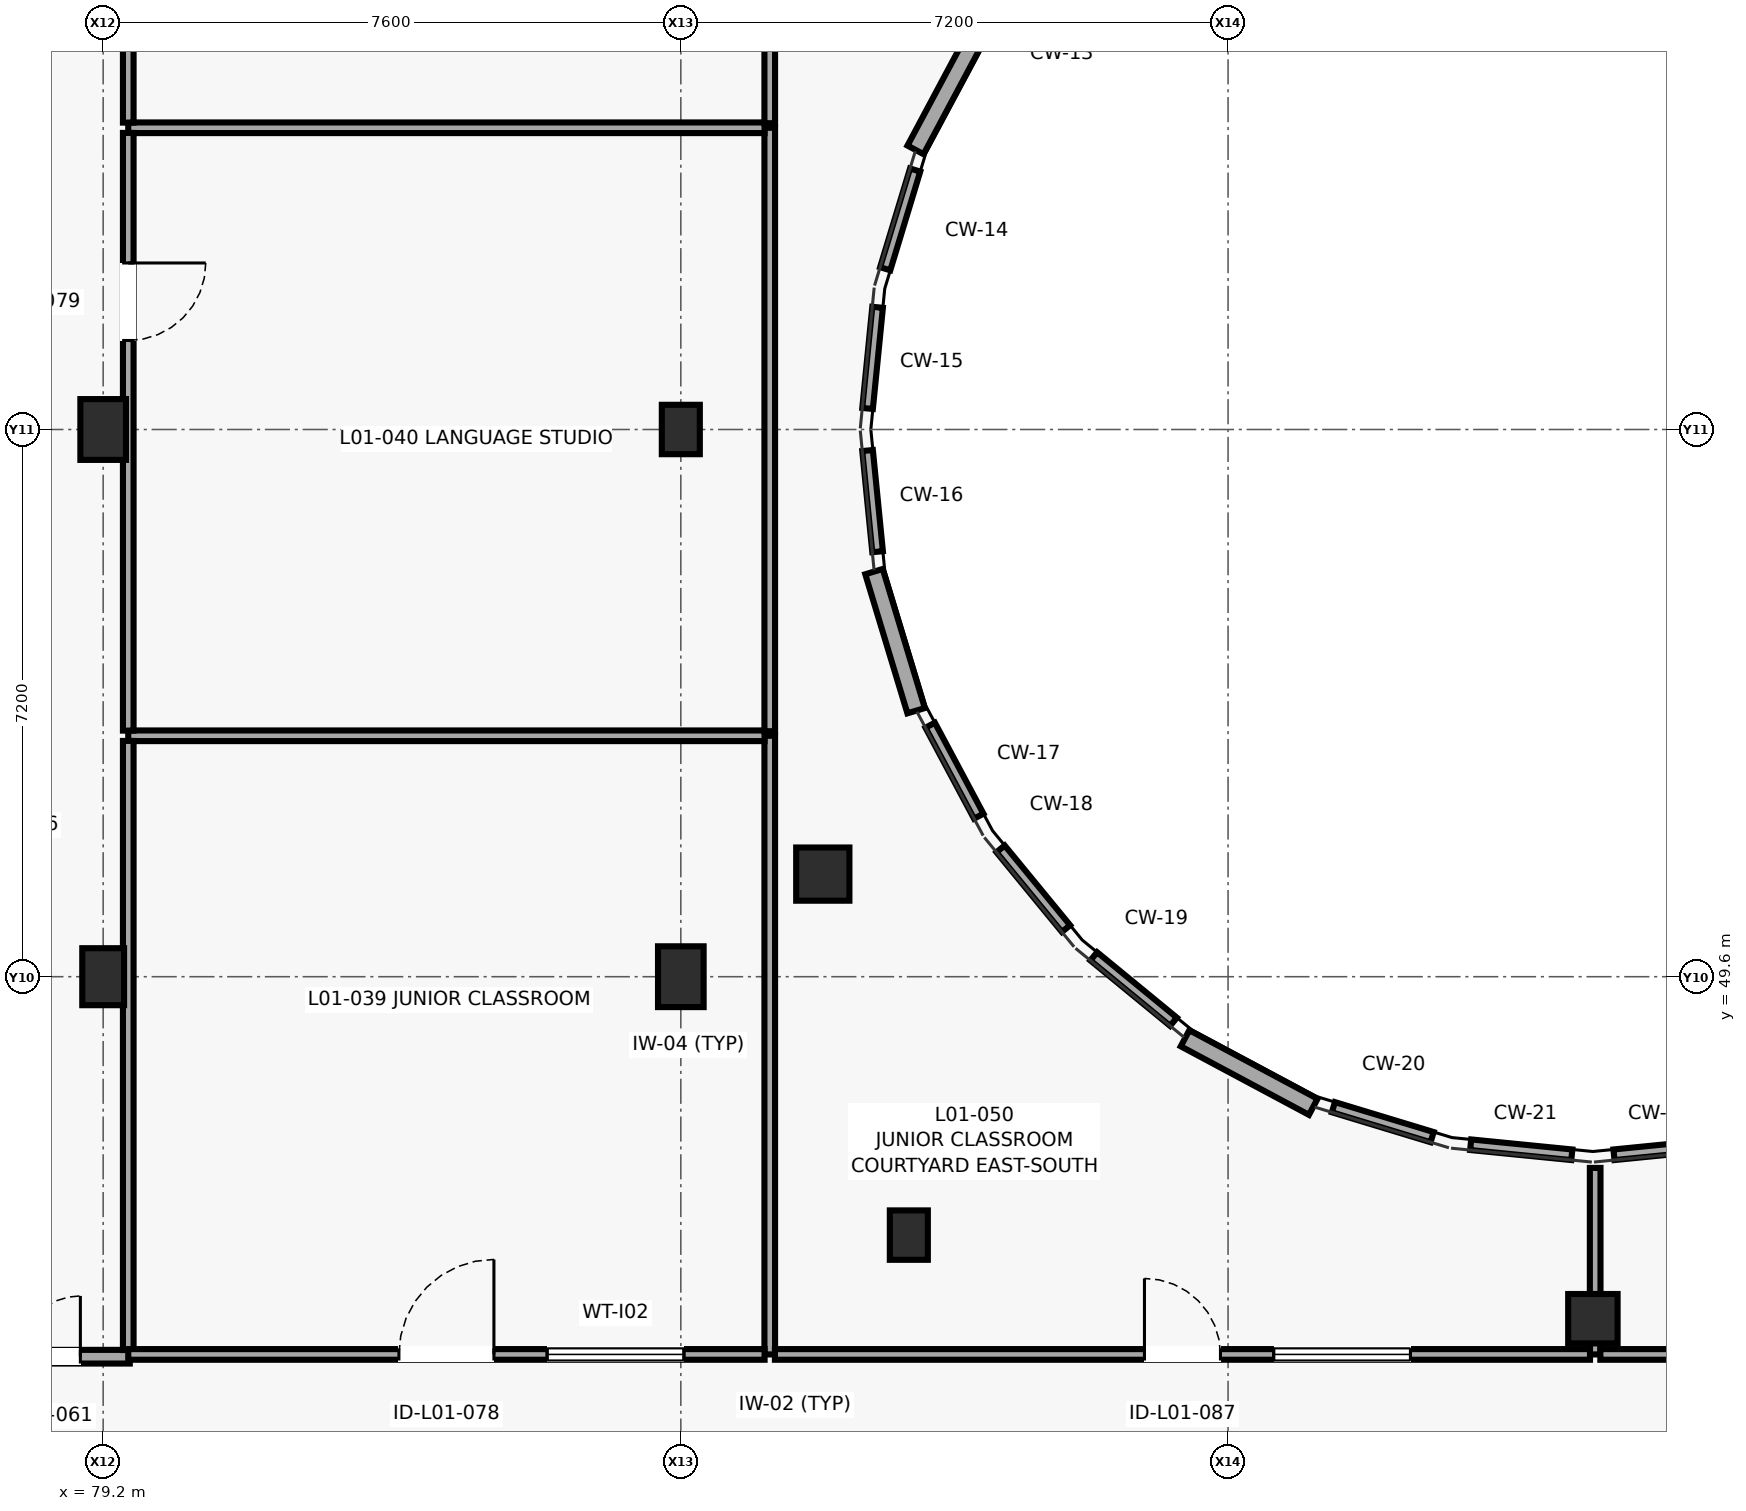
"""IFC4 building model, lengths in metres.
Left out: names, types, materials, properties, quantities, classifications, styles, units other than length and angle.
Written with IfcOpenShell. Run it as: python <this file> out.ifc"""

import sys

from ifc_helpers import new_model, si_unit, direction, frame, frame_2d, origin, origin_2d, place, context, subcontext, project, spatial, rectangle, circle, extrude, element, fill, save


model = new_model("IFC4")
c1 = context("Model", 3, precision=1e-05, world=origin(), true_north=direction((0.0, 1.0)))
c2 = subcontext(c1, "Body", "Model", "MODEL_VIEW")
j1 = project(units=[si_unit("LENGTHUNIT", "METRE"), si_unit("PLANEANGLEUNIT", "RADIAN")], contexts=[c1])
p1 = place(None, origin())
s1 = spatial("IfcSite", under=j1, at=p1, CompositionType="ELEMENT")
p2 = place(p1, origin())
s2 = spatial("IfcBuilding", under=s1, at=p2, CompositionType="ELEMENT")
p3 = place(p2, frame((0.0, 0.0, 4.2)))
s3 = spatial("IfcBuildingStorey", under=s2, at=p3, CompositionType="ELEMENT", Elevation=4.2)
p4 = place(p3, frame((79.2, 49.6, 0.0), z_axis=(0.0, 0.0, 1.0), x_axis=(1.0, 0.0, 0.0)))
e1 = element("IfcColumn", 1, at=p4, inside=s3, PredefinedType="COLUMN", context=c2, shape_type="SweptSolid", body=[
    extrude(rectangle(XDim=0.55, YDim=0.75, at=origin_2d()), origin(), (0.0, 0.0, 1.0), 4.0),
])
for number, where, z_axis, x_axis in (
    (2, (79.2, 56.8, 0.0), (0.0, 0.0, 1.0), (1.0, 0.0, 0.0)),
    (3, (86.8, 49.6, 0.0), (0.0, 0.0, 1.0), (1.0, 0.0, 0.0)),
):
    element("IfcColumn", number, at=place(p3, frame(where, z_axis=z_axis, x_axis=x_axis)), inside=s3, PredefinedType="COLUMN", context=c2, shape_type="SweptSolid", body=[
        extrude(rectangle(XDim=0.6, YDim=0.8, at=origin_2d()), origin(), (0.0, 0.0, 1.0), 4.0),
    ])
p5 = place(p3, frame((86.8, 56.8, 0.0), z_axis=(0.0, 0.0, 1.0), x_axis=(1.0, 0.0, 0.0)))
e4 = element("IfcColumn", 4, at=p5, inside=s3, PredefinedType="COLUMN", context=c2, shape_type="SweptSolid", body=[
    extrude(rectangle(XDim=0.5, YDim=0.65, at=origin_2d()), origin(), (0.0, 0.0, 1.0), 4.0),
])
p6 = place(p3, frame((88.668, 50.95, 0.0), z_axis=(0.0, 0.0, 1.0), x_axis=(1.0, 0.0, 0.0)))
e5 = element("IfcColumn", 5, at=p6, inside=s3, PredefinedType="COLUMN", context=c2, shape_type="SweptSolid", body=[
    extrude(circle(Radius=0.35, at=origin_2d()), origin(), (0.0, 0.0, 1.0), 4.0),
])
p7 = place(p3, frame((89.8, 46.2, 0.0), z_axis=(0.0, 0.0, 1.0), x_axis=(1.0, 0.0, 0.0)))
e6 = element("IfcColumn", 6, at=p7, inside=s3, PredefinedType="COLUMN", context=c2, shape_type="SweptSolid", body=[
    extrude(rectangle(XDim=0.5, YDim=0.65, at=origin_2d()), origin(), (0.0, 0.0, 1.0), 4.0),
])
p8 = place(p3, frame((98.8, 45.1, 0.0), z_axis=(0.0, 0.0, 1.0), x_axis=(1.0, 0.0, 0.0)))
e7 = element("IfcColumn", 7, at=p8, inside=s3, PredefinedType="COLUMN", context=c2, shape_type="SweptSolid", body=[
    extrude(circle(Radius=0.325, at=origin_2d()), origin(), (0.0, 0.0, 1.0), 4.0),
])
p9 = place(p3, frame((90.79, 62.166, 0.0), z_axis=(0.0, 0.0, 1.0), x_axis=(-0.471548403175, -0.881840180227, 0.0)))
e8 = element("IfcWall", 8, at=p9, inside=s3, PredefinedType="SOLIDWALL", context=c2, shape_type="SweptSolid", body=[
    extrude(rectangle(XDim=1.913, YDim=0.24, at=frame_2d((0.957, 0.0))), origin(), (0.0, 0.0, 1.0), 3.78),
])
p10 = place(p3, frame((89.342, 54.93, 0.0), z_axis=(0.0, 0.0, 1.0), x_axis=(0.289748657608, -0.957102771605, 0.0)))
e9 = element("IfcWall", 9, at=p10, inside=s3, PredefinedType="SOLIDWALL", context=c2, shape_type="SweptSolid", body=[
    extrude(rectangle(XDim=1.912, YDim=0.24, at=frame_2d((0.956, 0.0))), origin(), (0.0, 0.0, 1.0), 3.78),
])
p11 = place(p3, frame((93.434, 48.79, 0.0), z_axis=(0.0, 0.0, 1.0), x_axis=(0.881840180227, -0.471548403175, 0.0)))
e10 = element("IfcWall", 10, at=p11, inside=s3, PredefinedType="SOLIDWALL", context=c2, shape_type="SweptSolid", body=[
    extrude(rectangle(XDim=1.913, YDim=0.24, at=frame_2d((0.957, 0.0))), origin(), (0.0, 0.0, 1.0), 3.78),
])
p12 = place(p3, frame((76.65, 44.6, 0.0), z_axis=(0.0, 0.0, 1.0), x_axis=(1.0, 0.0, 0.0)))
e11 = element("IfcWall", 11, at=p12, inside=s3, PredefinedType="PARTITIONING", context=c2, shape_type="SweptSolid", body=[
    extrude(rectangle(XDim=2.9, YDim=0.18, at=frame_2d((1.45, 0.0))), origin(), (0.0, 0.0, 1.0), 3.78),
])
p13 = place(p12, frame((0.65, 0.0, 0.0)))
e12 = element("IfcOpeningElement", 12, at=p13, cuts=e11, PredefinedType="OPENING", context=c2, shape_type="SweptSolid", body=[
    extrude(rectangle(XDim=1.6, YDim=2.25, at=frame_2d((0.8, 1.125))), frame((0.0, 0.1, 0.0), z_axis=(0.0, -1.0, 0.0), x_axis=(1.0, 0.0, 0.0)), (0.0, 0.0, 1.0), 0.2),
])
p14 = place(p3, frame((87.97, 44.63, 0.0), z_axis=(0.0, 0.0, 1.0), x_axis=(0.0, 1.0, 0.0)))
e13 = element("IfcWall", 13, at=p14, inside=s3, PredefinedType="PARTITIONING", context=c2, shape_type="SweptSolid", body=[
    extrude(rectangle(XDim=8.14, YDim=0.14, at=frame_2d((4.07, 0.0))), origin(), (0.0, 0.0, 1.0), 3.775),
])
p15 = place(p3, frame((87.902, 52.77, 0.0), z_axis=(0.0, 0.0, 1.0), x_axis=(-1.0, 0.0, 0.0)))
e14 = element("IfcWall", 14, at=p15, inside=s3, PredefinedType="PARTITIONING", context=c2, shape_type="SweptSolid", body=[
    extrude(rectangle(XDim=8.372, YDim=0.14, at=frame_2d((4.186, 0.0))), origin(), (0.0, 0.0, 1.0), 3.775),
])
p16 = place(p3, frame((79.53, 52.702, 0.0), z_axis=(0.0, 0.0, 1.0), x_axis=(0.0, -1.0, 0.0)))
e15 = element("IfcWall", 15, at=p16, inside=s3, PredefinedType="PARTITIONING", context=c2, shape_type="SweptSolid", body=[
    extrude(rectangle(XDim=8.014, YDim=0.14, at=frame_2d((4.007, 0.0))), origin(), (0.0, 0.0, 1.0), 3.775),
])
p17 = place(p3, frame((79.53, 44.63, 0.0), z_axis=(0.0, 0.0, 1.0), x_axis=(1.0, 0.0, 0.0)))
e16 = element("IfcWall", 16, at=p17, inside=s3, PredefinedType="PARTITIONING", context=c2, shape_type="SweptSolid", body=[
    extrude(rectangle(XDim=8.372, YDim=0.14, at=frame_2d((4.186, 0.0))), origin(), (0.0, 0.0, 1.0), 3.775),
])
p18 = place(p17, frame((3.561, 0.0, 0.0)))
e17 = element("IfcOpeningElement", 17, at=p18, cuts=e16, PredefinedType="OPENING", context=c2, shape_type="SweptSolid", body=[
    extrude(rectangle(XDim=1.25, YDim=2.22, at=frame_2d((0.625, 1.11))), frame((0.0, 0.08, 0.0), z_axis=(0.0, -1.0, 0.0), x_axis=(1.0, 0.0, 0.0)), (0.0, 0.0, 1.0), 0.16),
])
p19 = place(p17, frame((5.511, 0.0, 1.05)))
e18 = element("IfcOpeningElement", 18, at=p19, cuts=e16, PredefinedType="OPENING", context=c2, shape_type="SweptSolid", body=[
    extrude(rectangle(XDim=1.8, YDim=1.2, at=frame_2d((0.9, 0.6))), frame((0.0, 0.08, 0.0), z_axis=(0.0, -1.0, 0.0), x_axis=(1.0, 0.0, 0.0)), (0.0, 0.0, 1.0), 0.16),
])
p20 = place(p3, frame((87.97, 52.83, 0.0), z_axis=(0.0, 0.0, 1.0), x_axis=(0.0, 1.0, 0.0)))
e19 = element("IfcWall", 19, at=p20, inside=s3, PredefinedType="PARTITIONING", context=c2, shape_type="SweptSolid", body=[
    extrude(rectangle(XDim=7.94, YDim=0.14, at=frame_2d((3.97, 0.0))), origin(), (0.0, 0.0, 1.0), 3.775),
])
p21 = place(p3, frame((87.902, 60.77, 0.0), z_axis=(0.0, 0.0, 1.0), x_axis=(-1.0, 0.0, 0.0)))
e20 = element("IfcWall", 20, at=p21, inside=s3, PredefinedType="PARTITIONING", context=c2, shape_type="SweptSolid", body=[
    extrude(rectangle(XDim=8.372, YDim=0.14, at=frame_2d((4.186, 0.0))), origin(), (0.0, 0.0, 1.0), 3.775),
])
p22 = place(p3, frame((79.53, 60.702, 0.0), z_axis=(0.0, 0.0, 1.0), x_axis=(0.0, -1.0, 0.0)))
e21 = element("IfcWall", 21, at=p22, inside=s3, PredefinedType="PARTITIONING", context=c2, shape_type="SweptSolid", body=[
    extrude(rectangle(XDim=7.864, YDim=0.14, at=frame_2d((3.932, 0.0))), origin(), (0.0, 0.0, 1.0), 3.775),
])
p23 = place(p22, frame((1.711, 0.0, 0.0)))
e22 = element("IfcOpeningElement", 22, at=p23, cuts=e21, PredefinedType="OPENING", context=c2, shape_type="SweptSolid", body=[
    extrude(rectangle(XDim=1.02, YDim=2.14, at=frame_2d((0.51, 1.07))), frame((0.0, 0.08, 0.0), z_axis=(0.0, -1.0, 0.0), x_axis=(1.0, 0.0, 0.0)), (0.0, 0.0, 1.0), 0.16),
])
p24 = place(p3, frame((79.53, 68.912, 0.0), z_axis=(0.0, 0.0, 1.0), x_axis=(0.0, -1.0, 0.0)))
e23 = element("IfcWall", 23, at=p24, inside=s3, PredefinedType="PARTITIONING", context=c2, shape_type="SweptSolid", body=[
    extrude(rectangle(XDim=8.074, YDim=0.14, at=frame_2d((4.037, 0.0))), origin(), (0.0, 0.0, 1.0), 3.775),
])
p25 = place(p3, frame((87.97, 60.83, 0.0), z_axis=(0.0, 0.0, 1.0), x_axis=(0.0, 1.0, 0.0)))
e24 = element("IfcWall", 24, at=p25, inside=s3, PredefinedType="PARTITIONING", context=c2, shape_type="SweptSolid", body=[
    extrude(rectangle(XDim=8.14, YDim=0.14, at=frame_2d((4.07, 0.0))), origin(), (0.0, 0.0, 1.0), 3.775),
])
p26 = place(p3, frame((100.408, 47.389, 0.0), z_axis=(0.0, 0.0, 1.0), x_axis=(-0.99513072014, -0.098563937798, 0.0)))
e25 = element("IfcWall", 25, at=p26, inside=s3, PredefinedType="PARTITIONING", context=c2, shape_type="SweptSolid", body=[
    extrude(rectangle(XDim=1.338, YDim=0.14, at=frame_2d((0.669, 0.0))), origin(), (0.0, 0.0, 1.0), 3.775),
])
p27 = place(p3, frame((98.83, 47.084, 0.0), z_axis=(0.0, 0.0, 1.0), x_axis=(0.0, -1.0, 0.0)))
e26 = element("IfcWall", 26, at=p27, inside=s3, PredefinedType="PARTITIONING", context=c2, shape_type="SweptSolid", body=[
    extrude(rectangle(XDim=2.454, YDim=0.14, at=frame_2d((1.227, 0.0))), origin(), (0.0, 0.0, 1.0), 3.775),
])
p28 = place(p3, frame((98.898, 44.63, 0.0), z_axis=(0.0, 0.0, 1.0), x_axis=(1.0, 0.0, 0.0)))
e27 = element("IfcWall", 27, at=p28, inside=s3, PredefinedType="PARTITIONING", context=c2, shape_type="SweptSolid", body=[
    extrude(rectangle(XDim=8.939, YDim=0.14, at=frame_2d((4.469, 0.0))), origin(), (0.0, 0.0, 1.0), 3.775),
])
p29 = place(p28, frame((3.97, 0.0, 0.0)))
e28 = element("IfcOpeningElement", 28, at=p29, cuts=e27, PredefinedType="OPENING", context=c2, shape_type="SweptSolid", body=[
    extrude(rectangle(XDim=1.0, YDim=2.1, at=frame_2d((0.5, 1.05))), frame((0.0, 0.08, 0.0), z_axis=(0.0, -1.0, 0.0), x_axis=(1.0, 0.0, 0.0)), (0.0, 0.0, 1.0), 0.16),
])
p30 = place(p28, frame((5.67, 0.0, 1.05)))
e29 = element("IfcOpeningElement", 29, at=p30, cuts=e27, PredefinedType="OPENING", context=c2, shape_type="SweptSolid", body=[
    extrude(rectangle(XDim=1.4, YDim=1.05, at=frame_2d((0.7, 0.525))), frame((0.0, 0.08, 0.0), z_axis=(0.0, -1.0, 0.0), x_axis=(1.0, 0.0, 0.0)), (0.0, 0.0, 1.0), 0.16),
])
p31 = place(p3, frame((88.038, 44.63, 0.0), z_axis=(0.0, 0.0, 1.0), x_axis=(1.0, 0.0, 0.0)))
e30 = element("IfcWall", 30, at=p31, inside=s3, PredefinedType="PARTITIONING", context=c2, shape_type="SweptSolid", body=[
    extrude(rectangle(XDim=10.724, YDim=0.14, at=frame_2d((5.362, 0.0))), origin(), (0.0, 0.0, 1.0), 3.775),
])
p32 = place(p31, frame((4.862, 0.0, 0.0)))
e31 = element("IfcOpeningElement", 31, at=p32, cuts=e30, PredefinedType="OPENING", context=c2, shape_type="SweptSolid", body=[
    extrude(rectangle(XDim=1.0, YDim=2.1, at=frame_2d((0.5, 1.05))), frame((0.0, 0.08, 0.0), z_axis=(0.0, -1.0, 0.0), x_axis=(1.0, 0.0, 0.0)), (0.0, 0.0, 1.0), 0.16),
])
p33 = place(p31, frame((6.562, 0.0, 1.05)))
e32 = element("IfcOpeningElement", 32, at=p33, cuts=e30, PredefinedType="OPENING", context=c2, shape_type="SweptSolid", body=[
    extrude(rectangle(XDim=1.8, YDim=1.2, at=frame_2d((0.9, 0.6))), frame((0.0, 0.08, 0.0), z_axis=(0.0, -1.0, 0.0), x_axis=(1.0, 0.0, 0.0)), (0.0, 0.0, 1.0), 0.16),
])
p34 = place(p3, frame((98.523, 47.257, 0.0), z_axis=(0.0, 0.0, 1.0), x_axis=(-0.99513072014, 0.098563937798, 0.0)))
e33 = element("IfcWall", 33, at=p34, inside=s3, PredefinedType="PARTITIONING", context=c2, shape_type="SweptSolid", body=[
    extrude(rectangle(XDim=1.338, YDim=0.14, at=frame_2d((0.669, 0.0))), origin(), (0.0, 0.0, 1.0), 3.775),
])
p35 = place(p3, frame((96.685, 47.489, 0.0), z_axis=(0.0, 0.0, 1.0), x_axis=(-0.956945716193, 0.290266939661, 0.0)))
e34 = element("IfcWall", 34, at=p35, inside=s3, PredefinedType="PARTITIONING", context=c2, shape_type="SweptSolid", body=[
    extrude(rectangle(XDim=1.357, YDim=0.14, at=frame_2d((0.679, 0.0))), origin(), (0.0, 0.0, 1.0), 3.775),
])
for number, where, z_axis, x_axis in (
    (35, (93.282, 49.007, 0.0), (0.0, 0.0, 1.0), (-0.773, 0.634, 0.0)),
    (36, (91.868, 50.233, 0.0), (0.0, 0.0, 1.0), (-0.634, 0.773, 0.0)),
    (37, (90.72, 51.712, 0.0), (0.0, 0.0, 1.0), (-0.471, 0.882, 0.0)),
):
    element("IfcWall", number, at=place(p3, frame(where, z_axis=z_axis, x_axis=x_axis)), inside=s3, PredefinedType="PARTITIONING", context=c2, shape_type="SweptSolid", body=[
        extrude(rectangle(XDim=1.357, YDim=0.14, at=frame_2d((0.678, 0.0))), origin(), (0.0, 0.0, 1.0), 3.775),
    ])
for number, where, z_axis, x_axis in (
    (38, (89.389, 55.192, 0.0), (0.0, 0.0, 1.0), (-0.099, 0.995, 0.0)),
    (39, (89.257, 57.077, 0.0), (0.0, 0.0, 1.0), (0.099, 0.995, 0.0)),
):
    element("IfcWall", number, at=place(p3, frame(where, z_axis=z_axis, x_axis=x_axis)), inside=s3, PredefinedType="PARTITIONING", context=c2, shape_type="SweptSolid", body=[
        extrude(rectangle(XDim=1.338, YDim=0.14, at=frame_2d((0.669, 0.0))), origin(), (0.0, 0.0, 1.0), 3.775),
    ])
p36 = place(p3, frame((89.489, 58.915, 0.0), z_axis=(0.0, 0.0, 1.0), x_axis=(0.290266939661, 0.956945716193, 0.0)))
e40 = element("IfcWall", 40, at=p36, inside=s3, PredefinedType="PARTITIONING", context=c2, shape_type="SweptSolid", body=[
    extrude(rectangle(XDim=1.357, YDim=0.14, at=frame_2d((0.679, 0.0))), origin(), (0.0, 0.0, 1.0), 3.775),
])
p37 = place(p13, origin())
e41 = element("IfcDoor", 41, at=p37, inside=s3, OperationType="DOUBLE_DOOR_SINGLE_SWING", PredefinedType="DOOR", context=c2, shape_type="SweptSolid", body=[
    extrude(rectangle(XDim=1.6, YDim=2.25, at=frame_2d((0.8, 1.125))), frame((0.0, 0.025, 0.0), z_axis=(0.0, -1.0, 0.0), x_axis=(1.0, 0.0, 0.0)), (0.0, 0.0, 1.0), 0.05),
])
fill(e12, e41)
p38 = place(p18, origin())
e42 = element("IfcDoor", 42, at=p38, inside=s3, OperationType="SINGLE_SWING_RIGHT", PredefinedType="DOOR", context=c2, shape_type="SweptSolid", body=[
    extrude(rectangle(XDim=1.25, YDim=2.22, at=frame_2d((0.625, 1.11))), frame((0.0, 0.025, 0.0), z_axis=(0.0, -1.0, 0.0), x_axis=(1.0, 0.0, 0.0)), (0.0, 0.0, 1.0), 0.05),
])
fill(e17, e42)
p39 = place(p19, origin())
e43 = element("IfcWindow", 43, at=p39, inside=s3, PartitioningType="SINGLE_PANEL", PredefinedType="WINDOW", context=c2, shape_type="SweptSolid", body=[
    extrude(rectangle(XDim=1.8, YDim=1.2, at=frame_2d((0.9, 0.6))), frame((0.0, 0.03, 0.0), z_axis=(0.0, -1.0, 0.0), x_axis=(1.0, 0.0, 0.0)), (0.0, 0.0, 1.0), 0.06),
])
fill(e18, e43)
p40 = place(p23, origin())
e44 = element("IfcDoor", 44, at=p40, inside=s3, OperationType="SINGLE_SWING_LEFT", PredefinedType="DOOR", context=c2, shape_type="SweptSolid", body=[
    extrude(rectangle(XDim=1.02, YDim=2.14, at=frame_2d((0.51, 1.07))), frame((0.0, 0.025, 0.0), z_axis=(0.0, -1.0, 0.0), x_axis=(1.0, 0.0, 0.0)), (0.0, 0.0, 1.0), 0.05),
])
fill(e22, e44)
p41 = place(p32, origin())
e45 = element("IfcDoor", 45, at=p41, inside=s3, OperationType="SINGLE_SWING_LEFT", PredefinedType="DOOR", context=c2, shape_type="SweptSolid", body=[
    extrude(rectangle(XDim=1.0, YDim=2.1, at=frame_2d((0.5, 1.05))), frame((0.0, 0.025, 0.0), z_axis=(0.0, -1.0, 0.0), x_axis=(1.0, 0.0, 0.0)), (0.0, 0.0, 1.0), 0.05),
])
fill(e31, e45)
p42 = place(p33, origin())
e46 = element("IfcWindow", 46, at=p42, inside=s3, PartitioningType="SINGLE_PANEL", PredefinedType="WINDOW", context=c2, shape_type="SweptSolid", body=[
    extrude(rectangle(XDim=1.8, YDim=1.2, at=frame_2d((0.9, 0.6))), frame((0.0, 0.03, 0.0), z_axis=(0.0, -1.0, 0.0), x_axis=(1.0, 0.0, 0.0)), (0.0, 0.0, 1.0), 0.06),
])
fill(e32, e46)
save(model, sys.argv[1])
